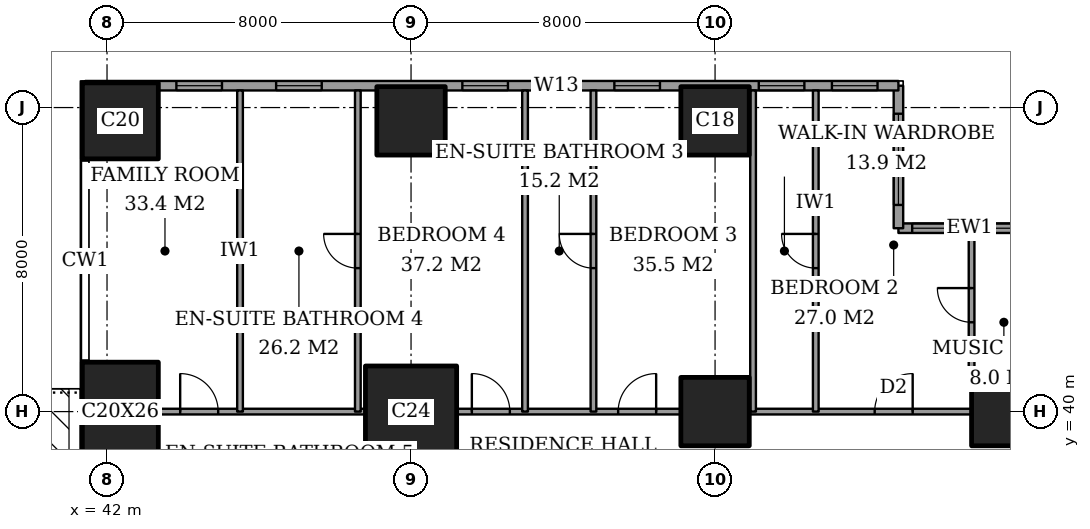
"""IFC4 building model, lengths in metres.
Left out: names, types, materials, properties, quantities, classifications, styles, units other than length and angle.
Written with IfcOpenShell. Run it as: python <this file> out.ifc"""

import sys

from ifc_helpers import new_model, si_unit, direction, frame, frame_2d, origin, origin_2d, place, context, subcontext, project, spatial, rectangle, extrude, element, fill, save


model = new_model("IFC4")
c1 = context("Model", 3, precision=1e-05, world=origin(), true_north=direction((0.0, 1.0)))
c2 = subcontext(c1, "Body", "Model", "MODEL_VIEW")
j1 = project(units=[si_unit("LENGTHUNIT", "METRE"), si_unit("PLANEANGLEUNIT", "RADIAN")], contexts=[c1])
p1 = place(None, origin())
s1 = spatial("IfcSite", under=j1, at=p1, CompositionType="ELEMENT")
p2 = place(p1, origin())
s2 = spatial("IfcBuilding", under=s1, at=p2, CompositionType="ELEMENT")
p3 = place(p2, frame((0.0, 0.0, 182.2)))
s3 = spatial("IfcBuildingStorey", under=s2, at=p3, CompositionType="ELEMENT", Elevation=182.2)
p4 = place(p3, frame((42.35, 40.0, 0.0), z_axis=(0.0, 0.0, 1.0), x_axis=(1.0, 0.0, 0.0)))
e1 = element("IfcColumn", 1, at=p4, inside=s3, PredefinedType="COLUMN", context=c2, shape_type="SweptSolid", body=[
    extrude(rectangle(XDim=2.0, YDim=2.6, at=origin_2d()), origin(), (0.0, 0.0, 1.0), 3.6),
])
p5 = place(p3, frame((42.35, 47.65, 0.0), z_axis=(0.0, 0.0, 1.0), x_axis=(1.0, 0.0, 0.0)))
e2 = element("IfcColumn", 2, at=p5, inside=s3, PredefinedType="COLUMN", context=c2, shape_type="SweptSolid", body=[
    extrude(rectangle(XDim=2.0, YDim=2.0, at=origin_2d()), origin(), (0.0, 0.0, 1.0), 3.6),
])
p6 = place(p3, frame((50.0, 40.0, 0.0), z_axis=(0.0, 0.0, 1.0), x_axis=(1.0, 0.0, 0.0)))
e3 = element("IfcColumn", 3, at=p6, inside=s3, PredefinedType="COLUMN", context=c2, shape_type="SweptSolid", body=[
    extrude(rectangle(XDim=2.4, YDim=2.4, at=origin_2d()), origin(), (0.0, 0.0, 1.0), 3.6),
])
for number, where, z_axis, x_axis in (
    (4, (50.0, 47.65, 0.0), (0.0, 0.0, 1.0), (1.0, 0.0, 0.0)),
    (5, (58.0, 40.0, 0.0), (0.0, 0.0, 1.0), (1.0, 0.0, 0.0)),
    (6, (58.0, 47.65, 0.0), (0.0, 0.0, 1.0), (1.0, 0.0, 0.0)),
    (7, (65.65, 40.0, 0.0), (0.0, 0.0, 1.0), (1.0, 0.0, 0.0)),
):
    element("IfcColumn", number, at=place(p3, frame(where, z_axis=z_axis, x_axis=x_axis)), inside=s3, PredefinedType="COLUMN", context=c2, shape_type="SweptSolid", body=[
        extrude(rectangle(XDim=1.8, YDim=1.8, at=origin_2d()), origin(), (0.0, 0.0, 1.0), 3.6),
    ])
p7 = place(p3, frame((66.575, 44.825, 0.0), z_axis=(0.0, 0.0, 1.0), x_axis=(-1.0, 0.0, 0.0)))
e8 = element("IfcWall", 8, at=p7, inside=s3, PredefinedType="SOLIDWALL", context=c2, shape_type="SweptSolid", body=[
    extrude(rectangle(XDim=3.75, YDim=0.25, at=frame_2d((1.875, 0.0))), origin(), (0.0, 0.0, 1.0), 3.6),
])
p8 = place(p7, frame((0.45, 0.0, 0.2)))
e9 = element("IfcOpeningElement", 9, at=p8, cuts=e8, PredefinedType="OPENING", context=c2, shape_type="SweptSolid", body=[
    extrude(rectangle(XDim=1.2, YDim=2.4, at=frame_2d((0.6, 1.2))), frame((0.0, 0.135, 0.0), z_axis=(0.0, -1.0, 0.0), x_axis=(1.0, 0.0, 0.0)), (0.0, 0.0, 1.0), 0.27),
])
p9 = place(p7, frame((2.188, 0.0, 0.2)))
e10 = element("IfcOpeningElement", 10, at=p9, cuts=e8, PredefinedType="OPENING", context=c2, shape_type="SweptSolid", body=[
    extrude(rectangle(XDim=1.2, YDim=2.4, at=frame_2d((0.6, 1.2))), frame((0.0, 0.135, 0.0), z_axis=(0.0, -1.0, 0.0), x_axis=(1.0, 0.0, 0.0)), (0.0, 0.0, 1.0), 0.27),
])
p10 = place(p3, frame((62.825, 44.825, 0.0), z_axis=(0.0, 0.0, 1.0), x_axis=(0.0, 1.0, 0.0)))
e11 = element("IfcWall", 11, at=p10, inside=s3, PredefinedType="SOLIDWALL", context=c2, shape_type="SweptSolid", body=[
    extrude(rectangle(XDim=3.75, YDim=0.25, at=frame_2d((1.875, 0.0))), origin(), (0.0, 0.0, 1.0), 3.6),
])
p11 = place(p10, frame((0.613, 0.0, 0.2)))
e12 = element("IfcOpeningElement", 12, at=p11, cuts=e11, PredefinedType="OPENING", context=c2, shape_type="SweptSolid", body=[
    extrude(rectangle(XDim=2.4, YDim=2.4, at=frame_2d((1.2, 1.2))), frame((0.0, 0.135, 0.0), z_axis=(0.0, -1.0, 0.0), x_axis=(1.0, 0.0, 0.0)), (0.0, 0.0, 1.0), 0.27),
])
p12 = place(p3, frame((62.825, 48.575, 0.0), z_axis=(0.0, 0.0, 1.0), x_axis=(-1.0, 0.0, 0.0)))
e13 = element("IfcWall", 13, at=p12, inside=s3, PredefinedType="SOLIDWALL", context=c2, shape_type="SweptSolid", body=[
    extrude(rectangle(XDim=21.4, YDim=0.25, at=frame_2d((10.7, 0.0))), origin(), (0.0, 0.0, 1.0), 3.6),
])
p13 = place(p12, frame((0.55, 0.0, 0.2)))
e14 = element("IfcOpeningElement", 14, at=p13, cuts=e13, PredefinedType="OPENING", context=c2, shape_type="SweptSolid", body=[
    extrude(rectangle(XDim=1.2, YDim=2.4, at=frame_2d((0.6, 1.2))), frame((0.0, 0.135, 0.0), z_axis=(0.0, -1.0, 0.0), x_axis=(1.0, 0.0, 0.0)), (0.0, 0.0, 1.0), 0.27),
])
p14 = place(p12, frame((2.475, 0.0, 0.2)))
e15 = element("IfcOpeningElement", 15, at=p14, cuts=e13, PredefinedType="OPENING", context=c2, shape_type="SweptSolid", body=[
    extrude(rectangle(XDim=1.2, YDim=2.4, at=frame_2d((0.6, 1.2))), frame((0.0, 0.135, 0.0), z_axis=(0.0, -1.0, 0.0), x_axis=(1.0, 0.0, 0.0)), (0.0, 0.0, 1.0), 0.27),
])
p15 = place(p12, frame((6.275, 0.0, 0.2)))
e16 = element("IfcOpeningElement", 16, at=p15, cuts=e13, PredefinedType="OPENING", context=c2, shape_type="SweptSolid", body=[
    extrude(rectangle(XDim=1.2, YDim=2.4, at=frame_2d((0.6, 1.2))), frame((0.0, 0.135, 0.0), z_axis=(0.0, -1.0, 0.0), x_axis=(1.0, 0.0, 0.0)), (0.0, 0.0, 1.0), 0.27),
])
p16 = place(p12, frame((8.4, 0.0, 0.2)))
e17 = element("IfcOpeningElement", 17, at=p16, cuts=e13, PredefinedType="OPENING", context=c2, shape_type="SweptSolid", body=[
    extrude(rectangle(XDim=1.2, YDim=2.4, at=frame_2d((0.6, 1.2))), frame((0.0, 0.135, 0.0), z_axis=(0.0, -1.0, 0.0), x_axis=(1.0, 0.0, 0.0)), (0.0, 0.0, 1.0), 0.27),
])
p17 = place(p12, frame((10.275, 0.0, 0.2)))
e18 = element("IfcOpeningElement", 18, at=p17, cuts=e13, PredefinedType="OPENING", context=c2, shape_type="SweptSolid", body=[
    extrude(rectangle(XDim=1.2, YDim=2.4, at=frame_2d((0.6, 1.2))), frame((0.0, 0.135, 0.0), z_axis=(0.0, -1.0, 0.0), x_axis=(1.0, 0.0, 0.0)), (0.0, 0.0, 1.0), 0.27),
])
p18 = place(p12, frame((15.175, 0.0, 0.2)))
e19 = element("IfcOpeningElement", 19, at=p18, cuts=e13, PredefinedType="OPENING", context=c2, shape_type="SweptSolid", body=[
    extrude(rectangle(XDim=1.2, YDim=2.4, at=frame_2d((0.6, 1.2))), frame((0.0, 0.135, 0.0), z_axis=(0.0, -1.0, 0.0), x_axis=(1.0, 0.0, 0.0)), (0.0, 0.0, 1.0), 0.27),
])
p19 = place(p12, frame((17.8, 0.0, 0.2)))
e20 = element("IfcOpeningElement", 20, at=p19, cuts=e13, PredefinedType="OPENING", context=c2, shape_type="SweptSolid", body=[
    extrude(rectangle(XDim=1.2, YDim=2.4, at=frame_2d((0.6, 1.2))), frame((0.0, 0.135, 0.0), z_axis=(0.0, -1.0, 0.0), x_axis=(1.0, 0.0, 0.0)), (0.0, 0.0, 1.0), 0.27),
])
p20 = place(p3, frame((43.35, 40.0, 0.0), z_axis=(0.0, 0.0, 1.0), x_axis=(1.0, 0.0, 0.0)))
e21 = element("IfcWall", 21, at=p20, inside=s3, PredefinedType="PARTITIONING", context=c2, shape_type="SweptSolid", body=[
    extrude(rectangle(XDim=5.45, YDim=0.15, at=frame_2d((2.725, 0.0))), origin(), (0.0, 0.0, 1.0), 3.35),
])
p21 = place(p20, frame((0.575, 0.0, 0.0)))
e22 = element("IfcOpeningElement", 22, at=p21, cuts=e21, PredefinedType="OPENING", context=c2, shape_type="SweptSolid", body=[
    extrude(rectangle(XDim=1.0, YDim=2.1, at=frame_2d((0.5, 1.05))), frame((0.0, 0.085, 0.0), z_axis=(0.0, -1.0, 0.0), x_axis=(1.0, 0.0, 0.0)), (0.0, 0.0, 1.0), 0.17),
])
p22 = place(p3, frame((51.2, 40.0, 0.0), z_axis=(0.0, 0.0, 1.0), x_axis=(1.0, 0.0, 0.0)))
e23 = element("IfcWall", 23, at=p22, inside=s3, PredefinedType="PARTITIONING", context=c2, shape_type="SweptSolid", body=[
    extrude(rectangle(XDim=5.9, YDim=0.15, at=frame_2d((2.95, 0.0))), origin(), (0.0, 0.0, 1.0), 3.35),
])
p23 = place(p22, frame((4.25, 0.0, 0.0)))
e24 = element("IfcOpeningElement", 24, at=p23, cuts=e23, PredefinedType="OPENING", context=c2, shape_type="SweptSolid", body=[
    extrude(rectangle(XDim=1.0, YDim=2.1, at=frame_2d((0.5, 1.05))), frame((0.0, 0.085, 0.0), z_axis=(0.0, -1.0, 0.0), x_axis=(1.0, 0.0, 0.0)), (0.0, 0.0, 1.0), 0.17),
])
p24 = place(p22, frame((0.4, 0.0, 0.0)))
e25 = element("IfcOpeningElement", 25, at=p24, cuts=e23, PredefinedType="OPENING", context=c2, shape_type="SweptSolid", body=[
    extrude(rectangle(XDim=1.0, YDim=2.1, at=frame_2d((0.5, 1.05))), frame((0.0, 0.085, 0.0), z_axis=(0.0, -1.0, 0.0), x_axis=(1.0, 0.0, 0.0)), (0.0, 0.0, 1.0), 0.17),
])
p25 = place(p3, frame((58.9, 40.0, 0.0), z_axis=(0.0, 0.0, 1.0), x_axis=(1.0, 0.0, 0.0)))
e26 = element("IfcWall", 26, at=p25, inside=s3, PredefinedType="PARTITIONING", context=c2, shape_type="SweptSolid", body=[
    extrude(rectangle(XDim=5.85, YDim=0.15, at=frame_2d((2.925, 0.0))), origin(), (0.0, 0.0, 1.0), 3.35),
])
p26 = place(p25, frame((3.3, 0.0, 0.0)))
e27 = element("IfcOpeningElement", 27, at=p26, cuts=e26, PredefinedType="OPENING", context=c2, shape_type="SweptSolid", body=[
    extrude(rectangle(XDim=1.0, YDim=2.1, at=frame_2d((0.5, 1.05))), frame((0.0, 0.085, 0.0), z_axis=(0.0, -1.0, 0.0), x_axis=(1.0, 0.0, 0.0)), (0.0, 0.0, 1.0), 0.17),
])
p27 = place(p3, frame((45.5, 40.0, 0.0), z_axis=(0.0, 0.0, 1.0), x_axis=(0.0, 1.0, 0.0)))
e28 = element("IfcWall", 28, at=p27, inside=s3, PredefinedType="PARTITIONING", context=c2, shape_type="SweptSolid", body=[
    extrude(rectangle(XDim=8.45, YDim=0.15, at=frame_2d((4.225, 0.0))), origin(), (0.0, 0.0, 1.0), 3.35),
])
p28 = place(p3, frame((48.6, 40.0, 0.0), z_axis=(0.0, 0.0, 1.0), x_axis=(0.0, 1.0, 0.0)))
e29 = element("IfcWall", 29, at=p28, inside=s3, PredefinedType="PARTITIONING", context=c2, shape_type="SweptSolid", body=[
    extrude(rectangle(XDim=8.45, YDim=0.15, at=frame_2d((4.225, 0.0))), origin(), (0.0, 0.0, 1.0), 3.35),
])
p29 = place(p28, frame((3.775, 0.0, 0.0)))
e30 = element("IfcOpeningElement", 30, at=p29, cuts=e29, PredefinedType="OPENING", context=c2, shape_type="SweptSolid", body=[
    extrude(rectangle(XDim=0.9, YDim=2.1, at=frame_2d((0.45, 1.05))), frame((0.0, 0.085, 0.0), z_axis=(0.0, -1.0, 0.0), x_axis=(1.0, 0.0, 0.0)), (0.0, 0.0, 1.0), 0.17),
])
p30 = place(p3, frame((53.0, 40.0, 0.0), z_axis=(0.0, 0.0, 1.0), x_axis=(0.0, 1.0, 0.0)))
e31 = element("IfcWall", 31, at=p30, inside=s3, PredefinedType="PARTITIONING", context=c2, shape_type="SweptSolid", body=[
    extrude(rectangle(XDim=8.45, YDim=0.15, at=frame_2d((4.225, 0.0))), origin(), (0.0, 0.0, 1.0), 3.35),
])
p31 = place(p3, frame((54.8, 40.0, 0.0), z_axis=(0.0, 0.0, 1.0), x_axis=(0.0, 1.0, 0.0)))
e32 = element("IfcWall", 32, at=p31, inside=s3, PredefinedType="PARTITIONING", context=c2, shape_type="SweptSolid", body=[
    extrude(rectangle(XDim=8.45, YDim=0.15, at=frame_2d((4.225, 0.0))), origin(), (0.0, 0.0, 1.0), 3.35),
])
p32 = place(p31, frame((3.775, 0.0, 0.0)))
e33 = element("IfcOpeningElement", 33, at=p32, cuts=e32, PredefinedType="OPENING", context=c2, shape_type="SweptSolid", body=[
    extrude(rectangle(XDim=0.9, YDim=2.1, at=frame_2d((0.45, 1.05))), frame((0.0, 0.085, 0.0), z_axis=(0.0, -1.0, 0.0), x_axis=(1.0, 0.0, 0.0)), (0.0, 0.0, 1.0), 0.17),
])
p33 = place(p3, frame((59.0, 40.0, 0.0), z_axis=(0.0, 0.0, 1.0), x_axis=(0.0, 1.0, 0.0)))
e34 = element("IfcWall", 34, at=p33, inside=s3, PredefinedType="PARTITIONING", context=c2, shape_type="SweptSolid", body=[
    extrude(rectangle(XDim=8.45, YDim=0.15, at=frame_2d((4.225, 0.0))), origin(), (0.0, 0.0, 1.0), 3.35),
])
p34 = place(p3, frame((60.65, 40.0, 0.0), z_axis=(0.0, 0.0, 1.0), x_axis=(0.0, 1.0, 0.0)))
e35 = element("IfcWall", 35, at=p34, inside=s3, PredefinedType="PARTITIONING", context=c2, shape_type="SweptSolid", body=[
    extrude(rectangle(XDim=8.45, YDim=0.15, at=frame_2d((4.225, 0.0))), origin(), (0.0, 0.0, 1.0), 3.35),
])
p35 = place(p34, frame((3.775, 0.0, 0.0)))
e36 = element("IfcOpeningElement", 36, at=p35, cuts=e35, PredefinedType="OPENING", context=c2, shape_type="SweptSolid", body=[
    extrude(rectangle(XDim=0.9, YDim=2.1, at=frame_2d((0.45, 1.05))), frame((0.0, 0.085, 0.0), z_axis=(0.0, -1.0, 0.0), x_axis=(1.0, 0.0, 0.0)), (0.0, 0.0, 1.0), 0.17),
])
p36 = place(p3, frame((64.75, 40.9, 0.0), z_axis=(0.0, 0.0, 1.0), x_axis=(0.0, 1.0, 0.0)))
e37 = element("IfcWall", 37, at=p36, inside=s3, PredefinedType="PARTITIONING", context=c2, shape_type="SweptSolid", body=[
    extrude(rectangle(XDim=3.8, YDim=0.15, at=frame_2d((1.9, 0.0))), origin(), (0.0, 0.0, 1.0), 3.35),
])
p37 = place(p36, frame((1.45, 0.0, 0.0)))
e38 = element("IfcOpeningElement", 38, at=p37, cuts=e37, PredefinedType="OPENING", context=c2, shape_type="SweptSolid", body=[
    extrude(rectangle(XDim=0.9, YDim=2.1, at=frame_2d((0.45, 1.05))), frame((0.0, 0.085, 0.0), z_axis=(0.0, -1.0, 0.0), x_axis=(1.0, 0.0, 0.0)), (0.0, 0.0, 1.0), 0.17),
])
p38 = place(p8, origin())
e39 = element("IfcWindow", 39, at=p38, inside=s3, PartitioningType="SINGLE_PANEL", PredefinedType="WINDOW", context=c2, shape_type="SweptSolid", body=[
    extrude(rectangle(XDim=1.2, YDim=2.4, at=frame_2d((0.6, 1.2))), frame((0.0, 0.03, 0.0), z_axis=(0.0, -1.0, 0.0), x_axis=(1.0, 0.0, 0.0)), (0.0, 0.0, 1.0), 0.06),
])
fill(e9, e39)
p39 = place(p9, origin())
e40 = element("IfcWindow", 40, at=p39, inside=s3, PartitioningType="SINGLE_PANEL", PredefinedType="WINDOW", context=c2, shape_type="SweptSolid", body=[
    extrude(rectangle(XDim=1.2, YDim=2.4, at=frame_2d((0.6, 1.2))), frame((0.0, 0.03, 0.0), z_axis=(0.0, -1.0, 0.0), x_axis=(1.0, 0.0, 0.0)), (0.0, 0.0, 1.0), 0.06),
])
fill(e10, e40)
p40 = place(p11, origin())
e41 = element("IfcWindow", 41, at=p40, inside=s3, PartitioningType="SINGLE_PANEL", PredefinedType="WINDOW", context=c2, shape_type="SweptSolid", body=[
    extrude(rectangle(XDim=2.4, YDim=2.4, at=frame_2d((1.2, 1.2))), frame((0.0, 0.03, 0.0), z_axis=(0.0, -1.0, 0.0), x_axis=(1.0, 0.0, 0.0)), (0.0, 0.0, 1.0), 0.06),
])
fill(e12, e41)
p41 = place(p13, origin())
e42 = element("IfcWindow", 42, at=p41, inside=s3, PartitioningType="SINGLE_PANEL", PredefinedType="WINDOW", context=c2, shape_type="SweptSolid", body=[
    extrude(rectangle(XDim=1.2, YDim=2.4, at=frame_2d((0.6, 1.2))), frame((0.0, 0.03, 0.0), z_axis=(0.0, -1.0, 0.0), x_axis=(1.0, 0.0, 0.0)), (0.0, 0.0, 1.0), 0.06),
])
fill(e14, e42)
p42 = place(p14, origin())
e43 = element("IfcWindow", 43, at=p42, inside=s3, PartitioningType="SINGLE_PANEL", PredefinedType="WINDOW", context=c2, shape_type="SweptSolid", body=[
    extrude(rectangle(XDim=1.2, YDim=2.4, at=frame_2d((0.6, 1.2))), frame((0.0, 0.03, 0.0), z_axis=(0.0, -1.0, 0.0), x_axis=(1.0, 0.0, 0.0)), (0.0, 0.0, 1.0), 0.06),
])
fill(e15, e43)
p43 = place(p15, origin())
e44 = element("IfcWindow", 44, at=p43, inside=s3, PartitioningType="SINGLE_PANEL", PredefinedType="WINDOW", context=c2, shape_type="SweptSolid", body=[
    extrude(rectangle(XDim=1.2, YDim=2.4, at=frame_2d((0.6, 1.2))), frame((0.0, 0.03, 0.0), z_axis=(0.0, -1.0, 0.0), x_axis=(1.0, 0.0, 0.0)), (0.0, 0.0, 1.0), 0.06),
])
fill(e16, e44)
p44 = place(p16, origin())
e45 = element("IfcWindow", 45, at=p44, inside=s3, PartitioningType="SINGLE_PANEL", PredefinedType="WINDOW", context=c2, shape_type="SweptSolid", body=[
    extrude(rectangle(XDim=1.2, YDim=2.4, at=frame_2d((0.6, 1.2))), frame((0.0, 0.03, 0.0), z_axis=(0.0, -1.0, 0.0), x_axis=(1.0, 0.0, 0.0)), (0.0, 0.0, 1.0), 0.06),
])
fill(e17, e45)
p45 = place(p17, origin())
e46 = element("IfcWindow", 46, at=p45, inside=s3, PartitioningType="SINGLE_PANEL", PredefinedType="WINDOW", context=c2, shape_type="SweptSolid", body=[
    extrude(rectangle(XDim=1.2, YDim=2.4, at=frame_2d((0.6, 1.2))), frame((0.0, 0.03, 0.0), z_axis=(0.0, -1.0, 0.0), x_axis=(1.0, 0.0, 0.0)), (0.0, 0.0, 1.0), 0.06),
])
fill(e18, e46)
p46 = place(p18, origin())
e47 = element("IfcWindow", 47, at=p46, inside=s3, PartitioningType="SINGLE_PANEL", PredefinedType="WINDOW", context=c2, shape_type="SweptSolid", body=[
    extrude(rectangle(XDim=1.2, YDim=2.4, at=frame_2d((0.6, 1.2))), frame((0.0, 0.03, 0.0), z_axis=(0.0, -1.0, 0.0), x_axis=(1.0, 0.0, 0.0)), (0.0, 0.0, 1.0), 0.06),
])
fill(e19, e47)
p47 = place(p19, origin())
e48 = element("IfcWindow", 48, at=p47, inside=s3, PartitioningType="SINGLE_PANEL", PredefinedType="WINDOW", context=c2, shape_type="SweptSolid", body=[
    extrude(rectangle(XDim=1.2, YDim=2.4, at=frame_2d((0.6, 1.2))), frame((0.0, 0.03, 0.0), z_axis=(0.0, -1.0, 0.0), x_axis=(1.0, 0.0, 0.0)), (0.0, 0.0, 1.0), 0.06),
])
fill(e20, e48)
p48 = place(p37, origin())
e49 = element("IfcDoor", 49, at=p48, inside=s3, OperationType="SINGLE_SWING_LEFT", PredefinedType="DOOR", context=c2, shape_type="SweptSolid", body=[
    extrude(rectangle(XDim=0.9, YDim=2.1, at=frame_2d((0.45, 1.05))), frame((0.0, 0.025, 0.0), z_axis=(0.0, -1.0, 0.0), x_axis=(1.0, 0.0, 0.0)), (0.0, 0.0, 1.0), 0.05),
])
fill(e38, e49)
p49 = place(p26, origin())
e50 = element("IfcDoor", 50, at=p49, inside=s3, OperationType="SINGLE_SWING_LEFT", PredefinedType="DOOR", context=c2, shape_type="SweptSolid", body=[
    extrude(rectangle(XDim=1.0, YDim=2.1, at=frame_2d((0.5, 1.05))), frame((0.0, 0.025, 0.0), z_axis=(0.0, -1.0, 0.0), x_axis=(1.0, 0.0, 0.0)), (0.0, 0.0, 1.0), 0.05),
])
fill(e27, e50)
p50 = place(p35, origin())
e51 = element("IfcDoor", 51, at=p50, inside=s3, OperationType="SINGLE_SWING_LEFT", PredefinedType="DOOR", context=c2, shape_type="SweptSolid", body=[
    extrude(rectangle(XDim=0.9, YDim=2.1, at=frame_2d((0.45, 1.05))), frame((0.0, 0.025, 0.0), z_axis=(0.0, -1.0, 0.0), x_axis=(1.0, 0.0, 0.0)), (0.0, 0.0, 1.0), 0.05),
])
fill(e36, e51)
p51 = place(p23, origin())
e52 = element("IfcDoor", 52, at=p51, inside=s3, OperationType="SINGLE_SWING_LEFT", PredefinedType="DOOR", context=c2, shape_type="SweptSolid", body=[
    extrude(rectangle(XDim=1.0, YDim=2.1, at=frame_2d((0.5, 1.05))), frame((0.0, 0.025, 0.0), z_axis=(0.0, -1.0, 0.0), x_axis=(1.0, 0.0, 0.0)), (0.0, 0.0, 1.0), 0.05),
])
fill(e24, e52)
p52 = place(p32, origin())
e53 = element("IfcDoor", 53, at=p52, inside=s3, OperationType="SINGLE_SWING_LEFT", PredefinedType="DOOR", context=c2, shape_type="SweptSolid", body=[
    extrude(rectangle(XDim=0.9, YDim=2.1, at=frame_2d((0.45, 1.05))), frame((0.0, 0.025, 0.0), z_axis=(0.0, -1.0, 0.0), x_axis=(1.0, 0.0, 0.0)), (0.0, 0.0, 1.0), 0.05),
])
fill(e33, e53)
p53 = place(p24, origin())
e54 = element("IfcDoor", 54, at=p53, inside=s3, OperationType="SINGLE_SWING_RIGHT", PredefinedType="DOOR", context=c2, shape_type="SweptSolid", body=[
    extrude(rectangle(XDim=1.0, YDim=2.1, at=frame_2d((0.5, 1.05))), frame((0.0, 0.025, 0.0), z_axis=(0.0, -1.0, 0.0), x_axis=(1.0, 0.0, 0.0)), (0.0, 0.0, 1.0), 0.05),
])
fill(e25, e54)
p54 = place(p29, origin())
e55 = element("IfcDoor", 55, at=p54, inside=s3, OperationType="SINGLE_SWING_LEFT", PredefinedType="DOOR", context=c2, shape_type="SweptSolid", body=[
    extrude(rectangle(XDim=0.9, YDim=2.1, at=frame_2d((0.45, 1.05))), frame((0.0, 0.025, 0.0), z_axis=(0.0, -1.0, 0.0), x_axis=(1.0, 0.0, 0.0)), (0.0, 0.0, 1.0), 0.05),
])
fill(e30, e55)
p55 = place(p21, origin())
e56 = element("IfcDoor", 56, at=p55, inside=s3, OperationType="SINGLE_SWING_RIGHT", PredefinedType="DOOR", context=c2, shape_type="SweptSolid", body=[
    extrude(rectangle(XDim=1.0, YDim=2.1, at=frame_2d((0.5, 1.05))), frame((0.0, 0.025, 0.0), z_axis=(0.0, -1.0, 0.0), x_axis=(1.0, 0.0, 0.0)), (0.0, 0.0, 1.0), 0.05),
])
fill(e22, e56)
save(model, sys.argv[1])
